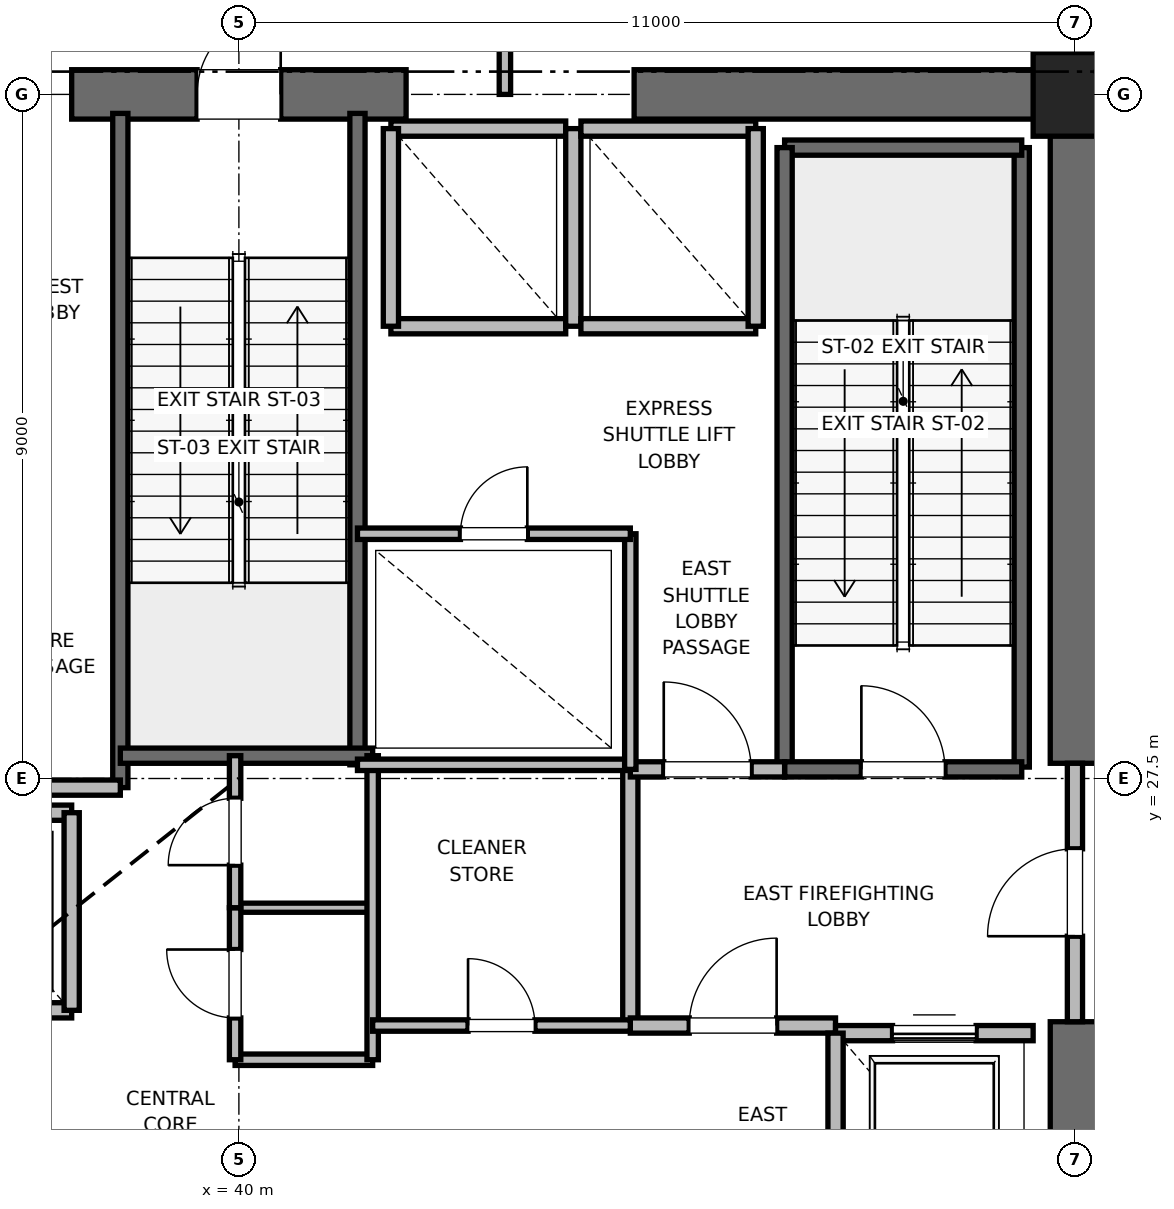
"""IFC4 building model, lengths in metres.
Left out: names, types, materials, properties, quantities, classifications, styles, units other than length and angle.
Written with IfcOpenShell. Run it as: python <this file> out.ifc"""

import sys

from ifc_helpers import new_model, si_unit, direction, frame, frame_2d, origin, origin_2d, place, context, subcontext, project, spatial, rectangle, extrude, element, fill, save


model = new_model("IFC4")
c1 = context("Model", 3, precision=1e-05, world=origin(), true_north=direction((0.0, 1.0)))
c2 = subcontext(c1, "Body", "Model", "MODEL_VIEW")
j1 = project(units=[si_unit("LENGTHUNIT", "METRE"), si_unit("PLANEANGLEUNIT", "RADIAN")], contexts=[c1])
p1 = place(None, origin())
s1 = spatial("IfcSite", under=j1, at=p1, CompositionType="ELEMENT")
p2 = place(p1, origin())
s2 = spatial("IfcBuilding", under=s1, at=p2, CompositionType="ELEMENT")
p3 = place(p2, frame((0.0, 0.0, 107.6)))
s3 = spatial("IfcBuildingStorey", under=s2, at=p3, CompositionType="ELEMENT", Elevation=107.6)
p4 = place(p3, frame((51.0, 36.5, 0.0), z_axis=(0.0, 0.0, 1.0), x_axis=(1.0, 0.0, 0.0)))
e1 = element("IfcColumn", 1, at=p4, inside=s3, PredefinedType="PILASTER", context=c2, shape_type="SweptSolid", body=[
    extrude(rectangle(XDim=1.1, YDim=1.1, at=origin_2d()), origin(), (0.0, 0.0, 1.0), 5.4),
])
p5 = place(p3, frame((37.8, 36.5, 0.0), z_axis=(0.0, 0.0, 1.0), x_axis=(1.0, 0.0, 0.0)))
e2 = element("IfcWall", 2, at=p5, inside=s3, PredefinedType="SHEAR", context=c2, shape_type="SweptSolid", body=[
    extrude(rectangle(XDim=4.4, YDim=0.65, at=frame_2d((2.2, 0.0))), origin(), (0.0, 0.0, 1.0), 5.1),
])
p6 = place(p5, frame((1.65, 0.0, 0.0)))
e3 = element("IfcOpeningElement", 3, at=p6, cuts=e2, PredefinedType="OPENING", context=c2, shape_type="SweptSolid", body=[
    extrude(rectangle(XDim=1.1, YDim=2.15, at=frame_2d((0.55, 1.075))), frame((0.0, 0.325, 0.0), z_axis=(0.0, -1.0, 0.0), x_axis=(1.0, 0.0, 0.0)), (0.0, 0.0, 1.0), 0.65),
])
for number, where, z_axis, x_axis in (
    (4, (45.2, 36.5, 0.0), (0.0, 0.0, 1.0), (1.0, 0.0, 0.0)),
    (5, (51.0, 18.5, 0.0), (0.0, 0.0, 1.0), (0.0, 1.0, 0.0)),
):
    element("IfcWall", number, at=place(p3, frame(where, z_axis=z_axis, x_axis=x_axis)), inside=s3, PredefinedType="SHEAR", context=c2, shape_type="SweptSolid", body=[
        extrude(rectangle(XDim=5.8, YDim=0.65, at=frame_2d((2.9, 0.0))), origin(), (0.0, 0.0, 1.0), 5.1),
    ])
p7 = place(p3, frame((51.0, 27.7, 0.0), z_axis=(0.0, 0.0, 1.0), x_axis=(0.0, 1.0, 0.0)))
e6 = element("IfcWall", 6, at=p7, inside=s3, PredefinedType="SHEAR", context=c2, shape_type="SweptSolid", body=[
    extrude(rectangle(XDim=8.8, YDim=0.65, at=frame_2d((4.4, 0.0))), origin(), (0.0, 0.0, 1.0), 5.1),
])
p8 = place(p3, frame((50.3, 27.65, 0.0), z_axis=(0.0, 0.0, 1.0), x_axis=(0.0, 1.0, 0.0)))
e7 = element("IfcWall", 7, at=p8, inside=s3, PredefinedType="SOLIDWALL", context=c2, shape_type="SweptSolid", body=[
    extrude(rectangle(XDim=8.15, YDim=0.2, at=frame_2d((4.075, 0.0))), origin(), (0.0, 0.0, 1.0), 5.1),
])
p9 = place(p3, frame((47.18, 35.8, 0.0), z_axis=(0.0, 0.0, 1.0), x_axis=(1.0, 0.0, 0.0)))
e8 = element("IfcWall", 8, at=p9, inside=s3, PredefinedType="SOLIDWALL", context=c2, shape_type="SweptSolid", body=[
    extrude(rectangle(XDim=3.12, YDim=0.2, at=frame_2d((1.56, 0.0))), origin(), (0.0, 0.0, 1.0), 5.1),
])
p10 = place(p3, frame((47.18, 27.62, 0.0), z_axis=(0.0, 0.0, 1.0), x_axis=(0.0, 1.0, 0.0)))
e9 = element("IfcWall", 9, at=p10, inside=s3, PredefinedType="SOLIDWALL", context=c2, shape_type="SweptSolid", body=[
    extrude(rectangle(XDim=8.18, YDim=0.2, at=frame_2d((4.09, 0.0))), origin(), (0.0, 0.0, 1.0), 5.1),
])
p11 = place(p3, frame((47.18, 27.62, 0.0), z_axis=(0.0, 0.0, 1.0), x_axis=(1.0, 0.0, 0.0)))
e10 = element("IfcWall", 10, at=p11, inside=s3, PredefinedType="SOLIDWALL", context=c2, shape_type="SweptSolid", body=[
    extrude(rectangle(XDim=3.12, YDim=0.2, at=frame_2d((1.56, 0.0))), origin(), (0.0, 0.0, 1.0), 5.1),
])
p12 = place(p11, frame((1.01, 0.0, 0.0)))
e11 = element("IfcOpeningElement", 11, at=p12, cuts=e10, PredefinedType="OPENING", context=c2, shape_type="SweptSolid", body=[
    extrude(rectangle(XDim=1.1, YDim=2.15, at=frame_2d((0.55, 1.075))), frame((0.0, 0.1, 0.0), z_axis=(0.0, -1.0, 0.0), x_axis=(1.0, 0.0, 0.0)), (0.0, 0.0, 1.0), 0.2),
])
p13 = place(p3, frame((38.44, 27.38, 0.0), z_axis=(0.0, 0.0, 1.0), x_axis=(0.0, 1.0, 0.0)))
e12 = element("IfcWall", 12, at=p13, inside=s3, PredefinedType="SOLIDWALL", context=c2, shape_type="SweptSolid", body=[
    extrude(rectangle(XDim=8.87, YDim=0.2, at=frame_2d((4.435, 0.0))), origin(), (0.0, 0.0, 1.0), 5.1),
])
p14 = place(p3, frame((41.56, 27.68, 0.0), z_axis=(0.0, 0.0, 1.0), x_axis=(0.0, 1.0, 0.0)))
e13 = element("IfcWall", 13, at=p14, inside=s3, PredefinedType="SOLIDWALL", context=c2, shape_type="SweptSolid", body=[
    extrude(rectangle(XDim=8.57, YDim=0.2, at=frame_2d((4.285, 0.0))), origin(), (0.0, 0.0, 1.0), 5.1),
])
p15 = place(p3, frame((38.44, 27.8, 0.0), z_axis=(0.0, 0.0, 1.0), x_axis=(1.0, 0.0, 0.0)))
e14 = element("IfcWall", 14, at=p15, inside=s3, PredefinedType="SOLIDWALL", context=c2, shape_type="SweptSolid", body=[
    extrude(rectangle(XDim=3.32, YDim=0.2, at=frame_2d((1.66, 0.0))), origin(), (0.0, 0.0, 1.0), 5.1),
])
p16 = place(p3, frame((32.82, 27.38, 0.0), z_axis=(0.0, 0.0, 1.0), x_axis=(1.0, 0.0, 0.0)))
e15 = element("IfcWall", 15, at=p16, inside=s3, PredefinedType="PARTITIONING", context=c2, shape_type="SweptSolid", body=[
    extrude(rectangle(XDim=5.62, YDim=0.2, at=frame_2d((2.81, 0.0))), origin(), (0.0, 0.0, 1.0), 5.1),
])
p17 = place(p3, frame((45.15, 24.25, 0.0), z_axis=(0.0, 0.0, 1.0), x_axis=(0.0, 1.0, 0.0)))
e16 = element("IfcWall", 16, at=p17, inside=s3, PredefinedType="PARTITIONING", context=c2, shape_type="SweptSolid", body=[
    extrude(rectangle(XDim=3.37, YDim=0.2, at=frame_2d((1.685, 0.0))), origin(), (0.0, 0.0, 1.0), 5.1),
])
p18 = place(p3, frame((45.15, 24.25, 0.0), z_axis=(0.0, 0.0, 1.0), x_axis=(1.0, 0.0, 0.0)))
e17 = element("IfcWall", 17, at=p18, inside=s3, PredefinedType="PARTITIONING", context=c2, shape_type="SweptSolid", body=[
    extrude(rectangle(XDim=2.7, YDim=0.2, at=frame_2d((1.35, 0.0))), origin(), (0.0, 0.0, 1.0), 5.1),
])
p19 = place(p18, frame((0.775, 0.0, 0.0)))
e18 = element("IfcOpeningElement", 18, at=p19, cuts=e17, PredefinedType="OPENING", context=c2, shape_type="SweptSolid", body=[
    extrude(rectangle(XDim=1.15, YDim=2.2, at=frame_2d((0.575, 1.1))), frame((0.0, 0.1, 0.0), z_axis=(0.0, -1.0, 0.0), x_axis=(1.0, 0.0, 0.0)), (0.0, 0.0, 1.0), 0.2),
])
p20 = place(p3, frame((45.15, 27.62, 0.0), z_axis=(0.0, 0.0, 1.0), x_axis=(1.0, 0.0, 0.0)))
e19 = element("IfcWall", 19, at=p20, inside=s3, PredefinedType="PARTITIONING", context=c2, shape_type="SweptSolid", body=[
    extrude(rectangle(XDim=2.03, YDim=0.2, at=frame_2d((1.015, 0.0))), origin(), (0.0, 0.0, 1.0), 5.1),
])
p21 = place(p20, frame((0.44, 0.0, 0.0)))
e20 = element("IfcOpeningElement", 20, at=p21, cuts=e19, PredefinedType="OPENING", context=c2, shape_type="SweptSolid", body=[
    extrude(rectangle(XDim=1.15, YDim=2.2, at=frame_2d((0.575, 1.1))), frame((0.0, 0.1, 0.0), z_axis=(0.0, -1.0, 0.0), x_axis=(1.0, 0.0, 0.0)), (0.0, 0.0, 1.0), 0.2),
])
p22 = place(p3, frame((51.0, 24.3, 0.0), z_axis=(0.0, 0.0, 1.0), x_axis=(0.0, 1.0, 0.0)))
e21 = element("IfcWall", 21, at=p22, inside=s3, PredefinedType="PARTITIONING", context=c2, shape_type="SweptSolid", body=[
    extrude(rectangle(XDim=3.4, YDim=0.2, at=frame_2d((1.7, 0.0))), origin(), (0.0, 0.0, 1.0), 3.88),
])
p23 = place(p22, frame((1.125, 0.0, 0.0)))
e22 = element("IfcOpeningElement", 22, at=p23, cuts=e21, PredefinedType="OPENING", context=c2, shape_type="SweptSolid", body=[
    extrude(rectangle(XDim=1.15, YDim=2.2, at=frame_2d((0.575, 1.1))), frame((0.0, 0.1, 0.0), z_axis=(0.0, -1.0, 0.0), x_axis=(1.0, 0.0, 0.0)), (0.0, 0.0, 1.0), 0.2),
])
p24 = place(p3, frame((50.45, 24.15, 0.0), z_axis=(0.0, 0.0, 1.0), x_axis=(-1.0, 0.0, 0.0)))
e23 = element("IfcWall", 23, at=p24, inside=s3, PredefinedType="SOLIDWALL", context=c2, shape_type="SweptSolid", body=[
    extrude(rectangle(XDim=2.6, YDim=0.2, at=frame_2d((1.3, 0.0))), origin(), (0.0, 0.0, 1.0), 3.88),
])
p25 = place(p24, frame((0.75, 0.0, 0.0)))
e24 = element("IfcOpeningElement", 24, at=p25, cuts=e23, PredefinedType="OPENING", context=c2, shape_type="SweptSolid", body=[
    extrude(rectangle(XDim=1.1, YDim=2.2, at=frame_2d((0.55, 1.1))), frame((0.0, 0.1, 0.0), z_axis=(0.0, -1.0, 0.0), x_axis=(1.0, 0.0, 0.0)), (0.0, 0.0, 1.0), 0.2),
])
p26 = place(p3, frame((47.85, 24.15, 0.0), z_axis=(0.0, 0.0, 1.0), x_axis=(0.0, -1.0, 0.0)))
e25 = element("IfcWall", 25, at=p26, inside=s3, PredefinedType="SOLIDWALL", context=c2, shape_type="SweptSolid", body=[
    extrude(rectangle(XDim=3.0, YDim=0.2, at=frame_2d((1.5, 0.0))), origin(), (0.0, 0.0, 1.0), 5.1),
])
p27 = place(p3, frame((35.5, 24.45, 0.0), z_axis=(0.0, 0.0, 1.0), x_axis=(1.0, 0.0, 0.0)))
e26 = element("IfcWall", 26, at=p27, inside=s3, PredefinedType="SOLIDWALL", context=c2, shape_type="SweptSolid", body=[
    extrude(rectangle(XDim=2.3, YDim=0.2, at=frame_2d((1.15, 0.0))), origin(), (0.0, 0.0, 1.0), 5.1),
])
p28 = place(p27, frame((0.6, 0.0, 0.0)))
e27 = element("IfcOpeningElement", 27, at=p28, cuts=e26, PredefinedType="OPENING", context=c2, shape_type="SweptSolid", body=[
    extrude(rectangle(XDim=1.1, YDim=2.2, at=frame_2d((0.55, 1.1))), frame((0.0, 0.1, 0.0), z_axis=(0.0, -1.0, 0.0), x_axis=(1.0, 0.0, 0.0)), (0.0, 0.0, 1.0), 0.2),
])
p29 = place(p3, frame((37.8, 27.05, 0.0), z_axis=(0.0, 0.0, 1.0), x_axis=(-1.0, 0.0, 0.0)))
e28 = element("IfcWall", 28, at=p29, inside=s3, PredefinedType="SOLIDWALL", context=c2, shape_type="SweptSolid", body=[
    extrude(rectangle(XDim=2.3, YDim=0.2, at=frame_2d((1.15, 0.0))), origin(), (0.0, 0.0, 1.0), 5.1),
])
p30 = place(p3, frame((37.8, 24.45, 0.0), z_axis=(0.0, 0.0, 1.0), x_axis=(0.0, 1.0, 0.0)))
e29 = element("IfcWall", 29, at=p30, inside=s3, PredefinedType="SOLIDWALL", context=c2, shape_type="SweptSolid", body=[
    extrude(rectangle(XDim=2.6, YDim=0.2, at=frame_2d((1.3, 0.0))), origin(), (0.0, 0.0, 1.0), 5.1),
])
p31 = place(p3, frame((42.0, 33.45, 0.0), z_axis=(0.0, 0.0, 1.0), x_axis=(1.0, 0.0, 0.0)))
e30 = element("IfcWall", 30, at=p31, inside=s3, PredefinedType="SOLIDWALL", context=c2, shape_type="SweptSolid", body=[
    extrude(rectangle(XDim=2.3, YDim=0.2, at=frame_2d((1.15, 0.0))), origin(), (0.0, 0.0, 1.0), 5.1),
])
p32 = place(p3, frame((44.3, 36.05, 0.0), z_axis=(0.0, 0.0, 1.0), x_axis=(-1.0, 0.0, 0.0)))
e31 = element("IfcWall", 31, at=p32, inside=s3, PredefinedType="SOLIDWALL", context=c2, shape_type="SweptSolid", body=[
    extrude(rectangle(XDim=2.3, YDim=0.2, at=frame_2d((1.15, 0.0))), origin(), (0.0, 0.0, 1.0), 3.88),
])
for number, where, z_axis, x_axis in (
    (32, (42.0, 36.05, 0.0), (0.0, 0.0, 1.0), (0.0, -1.0, 0.0)),
    (33, (44.4, 33.45, 0.0), (0.0, 0.0, 1.0), (0.0, 1.0, 0.0)),
):
    element("IfcWall", number, at=place(p3, frame(where, z_axis=z_axis, x_axis=x_axis)), inside=s3, PredefinedType="SOLIDWALL", context=c2, shape_type="SweptSolid", body=[
        extrude(rectangle(XDim=2.6, YDim=0.2, at=frame_2d((1.3, 0.0))), origin(), (0.0, 0.0, 1.0), 3.88),
    ])
p33 = place(p3, frame((44.5, 33.45, 0.0), z_axis=(0.0, 0.0, 1.0), x_axis=(1.0, 0.0, 0.0)))
e34 = element("IfcWall", 34, at=p33, inside=s3, PredefinedType="SOLIDWALL", context=c2, shape_type="SweptSolid", body=[
    extrude(rectangle(XDim=2.3, YDim=0.2, at=frame_2d((1.15, 0.0))), origin(), (0.0, 0.0, 1.0), 5.1),
])
p34 = place(p3, frame((46.8, 36.05, 0.0), z_axis=(0.0, 0.0, 1.0), x_axis=(-1.0, 0.0, 0.0)))
e35 = element("IfcWall", 35, at=p34, inside=s3, PredefinedType="SOLIDWALL", context=c2, shape_type="SweptSolid", body=[
    extrude(rectangle(XDim=2.3, YDim=0.2, at=frame_2d((1.15, 0.0))), origin(), (0.0, 0.0, 1.0), 3.88),
])
p35 = place(p3, frame((46.8, 33.45, 0.0), z_axis=(0.0, 0.0, 1.0), x_axis=(0.0, 1.0, 0.0)))
e36 = element("IfcWall", 36, at=p35, inside=s3, PredefinedType="SOLIDWALL", context=c2, shape_type="SweptSolid", body=[
    extrude(rectangle(XDim=2.6, YDim=0.2, at=frame_2d((1.3, 0.0))), origin(), (0.0, 0.0, 1.0), 5.1),
])
p36 = place(p3, frame((39.95, 23.8, 0.0), z_axis=(0.0, 0.0, 1.0), x_axis=(1.0, 0.0, 0.0)))
e37 = element("IfcWall", 37, at=p36, inside=s3, PredefinedType="PARTITIONING", context=c2, shape_type="SweptSolid", body=[
    extrude(rectangle(XDim=1.81, YDim=0.15, at=frame_2d((0.905, 0.0))), origin(), (0.0, 0.0, 1.0), 2.85),
])
p37 = place(p3, frame((39.95, 25.8, 0.0), z_axis=(0.0, 0.0, 1.0), x_axis=(1.0, 0.0, 0.0)))
e38 = element("IfcWall", 38, at=p37, inside=s3, PredefinedType="PARTITIONING", context=c2, shape_type="SweptSolid", body=[
    extrude(rectangle(XDim=1.81, YDim=0.12, at=frame_2d((0.905, 0.0))), origin(), (0.0, 0.0, 1.0), 2.85),
])
p38 = place(p3, frame((41.76, 23.8, 0.0), z_axis=(0.0, 0.0, 1.0), x_axis=(0.0, 1.0, 0.0)))
e39 = element("IfcWall", 39, at=p38, inside=s3, PredefinedType="PARTITIONING", context=c2, shape_type="SweptSolid", body=[
    extrude(rectangle(XDim=4.0, YDim=0.15, at=frame_2d((2.0, 0.0))), origin(), (0.0, 0.0, 1.0), 2.85),
])
p39 = place(p3, frame((39.95, 23.8, 0.0), z_axis=(0.0, 0.0, 1.0), x_axis=(0.0, 1.0, 0.0)))
e40 = element("IfcWall", 40, at=p39, inside=s3, PredefinedType="PARTITIONING", context=c2, shape_type="SweptSolid", body=[
    extrude(rectangle(XDim=2.0, YDim=0.15, at=frame_2d((1.0, 0.0))), origin(), (0.0, 0.0, 1.0), 2.85),
])
p40 = place(p39, frame((0.55, 0.0, 0.0)))
e41 = element("IfcOpeningElement", 41, at=p40, cuts=e40, PredefinedType="OPENING", context=c2, shape_type="SweptSolid", body=[
    extrude(rectangle(XDim=0.9, YDim=2.1, at=frame_2d((0.45, 1.05))), frame((0.0, 0.075, 0.0), z_axis=(0.0, -1.0, 0.0), x_axis=(1.0, 0.0, 0.0)), (0.0, 0.0, 1.0), 0.15),
])
p41 = place(p3, frame((39.95, 25.8, 0.0), z_axis=(0.0, 0.0, 1.0), x_axis=(0.0, 1.0, 0.0)))
e42 = element("IfcWall", 42, at=p41, inside=s3, PredefinedType="PARTITIONING", context=c2, shape_type="SweptSolid", body=[
    extrude(rectangle(XDim=2.0, YDim=0.15, at=frame_2d((1.0, 0.0))), origin(), (0.0, 0.0, 1.0), 2.85),
])
p42 = place(p41, frame((0.56, 0.0, 0.0)))
e43 = element("IfcOpeningElement", 43, at=p42, cuts=e42, PredefinedType="OPENING", context=c2, shape_type="SweptSolid", body=[
    extrude(rectangle(XDim=0.88, YDim=2.1, at=frame_2d((0.44, 1.05))), frame((0.0, 0.075, 0.0), z_axis=(0.0, -1.0, 0.0), x_axis=(1.0, 0.0, 0.0)), (0.0, 0.0, 1.0), 0.15),
])
p43 = place(p3, frame((41.56, 27.68, 0.0), z_axis=(0.0, 0.0, 1.0), x_axis=(1.0, 0.0, 0.0)))
e44 = element("IfcWall", 44, at=p43, inside=s3, PredefinedType="PARTITIONING", context=c2, shape_type="SweptSolid", body=[
    extrude(rectangle(XDim=3.59, YDim=0.15, at=frame_2d((1.795, 0.0))), origin(), (0.0, 0.0, 1.0), 2.85),
])
p44 = place(p3, frame((41.76, 24.25, 0.0), z_axis=(0.0, 0.0, 1.0), x_axis=(1.0, 0.0, 0.0)))
e45 = element("IfcWall", 45, at=p44, inside=s3, PredefinedType="PARTITIONING", context=c2, shape_type="SweptSolid", body=[
    extrude(rectangle(XDim=3.39, YDim=0.15, at=frame_2d((1.695, 0.0))), origin(), (0.0, 0.0, 1.0), 2.85),
])
p45 = place(p44, frame((1.255, 0.0, 0.0)))
e46 = element("IfcOpeningElement", 46, at=p45, cuts=e45, PredefinedType="OPENING", context=c2, shape_type="SweptSolid", body=[
    extrude(rectangle(XDim=0.88, YDim=2.1, at=frame_2d((0.44, 1.05))), frame((0.0, 0.075, 0.0), z_axis=(0.0, -1.0, 0.0), x_axis=(1.0, 0.0, 0.0)), (0.0, 0.0, 1.0), 0.15),
])
p46 = place(p3, frame((45.15, 27.62, 0.0), z_axis=(0.0, 0.0, 1.0), x_axis=(0.0, 1.0, 0.0)))
e47 = element("IfcWall", 47, at=p46, inside=s3, PredefinedType="PARTITIONING", context=c2, shape_type="SweptSolid", body=[
    extrude(rectangle(XDim=3.1, YDim=0.15, at=frame_2d((1.55, 0.0))), origin(), (0.0, 0.0, 1.0), 2.85),
])
p47 = place(p3, frame((41.56, 30.72, 0.0), z_axis=(0.0, 0.0, 1.0), x_axis=(1.0, 0.0, 0.0)))
e48 = element("IfcWall", 48, at=p47, inside=s3, PredefinedType="PARTITIONING", context=c2, shape_type="SweptSolid", body=[
    extrude(rectangle(XDim=3.59, YDim=0.15, at=frame_2d((1.795, 0.0))), origin(), (0.0, 0.0, 1.0), 2.85),
])
p48 = place(p47, frame((1.355, 0.0, 0.0)))
e49 = element("IfcOpeningElement", 49, at=p48, cuts=e48, PredefinedType="OPENING", context=c2, shape_type="SweptSolid", body=[
    extrude(rectangle(XDim=0.88, YDim=2.1, at=frame_2d((0.44, 1.05))), frame((0.0, 0.075, 0.0), z_axis=(0.0, -1.0, 0.0), x_axis=(1.0, 0.0, 0.0)), (0.0, 0.0, 1.0), 0.15),
])
p49 = place(p3, frame((43.5, 36.5, 0.0), z_axis=(0.0, 0.0, 1.0), x_axis=(0.0, 1.0, 0.0)))
e50 = element("IfcWall", 50, at=p49, inside=s3, PredefinedType="PARTITIONING", context=c2, shape_type="SweptSolid", body=[
    extrude(rectangle(XDim=2.7, YDim=0.15, at=frame_2d((1.35, 0.0))), origin(), (0.0, 0.0, 1.0), 2.85),
])
p50 = place(p49, frame((0.875, 0.0, 0.0)))
e51 = element("IfcOpeningElement", 51, at=p50, cuts=e50, PredefinedType="OPENING", context=c2, shape_type="SweptSolid", body=[
    extrude(rectangle(XDim=0.95, YDim=2.15, at=frame_2d((0.475, 1.075))), frame((0.0, 0.075, 0.0), z_axis=(0.0, -1.0, 0.0), x_axis=(1.0, 0.0, 0.0)), (0.0, 0.0, 1.0), 0.15),
])
p51 = place(p12, origin())
e52 = element("IfcDoor", 52, at=p51, inside=s3, OperationType="SINGLE_SWING_LEFT", PredefinedType="DOOR", context=c2, shape_type="SweptSolid", body=[
    extrude(rectangle(XDim=1.1, YDim=2.15, at=frame_2d((0.55, 1.075))), frame((0.0, 0.025, 0.0), z_axis=(0.0, -1.0, 0.0), x_axis=(1.0, 0.0, 0.0)), (0.0, 0.0, 1.0), 0.05),
])
fill(e11, e52)
p52 = place(p6, origin())
e53 = element("IfcDoor", 53, at=p52, inside=s3, OperationType="SINGLE_SWING_RIGHT", PredefinedType="DOOR", context=c2, shape_type="SweptSolid", body=[
    extrude(rectangle(XDim=1.1, YDim=2.15, at=frame_2d((0.55, 1.075))), frame((0.0, 0.025, 0.0), z_axis=(0.0, -1.0, 0.0), x_axis=(1.0, 0.0, 0.0)), (0.0, 0.0, 1.0), 0.05),
])
fill(e3, e53)
p53 = place(p19, origin())
e54 = element("IfcDoor", 54, at=p53, inside=s3, OperationType="SINGLE_SWING_RIGHT", PredefinedType="DOOR", context=c2, shape_type="SweptSolid", body=[
    extrude(rectangle(XDim=1.15, YDim=2.2, at=frame_2d((0.575, 1.1))), frame((0.0, 0.025, 0.0), z_axis=(0.0, -1.0, 0.0), x_axis=(1.0, 0.0, 0.0)), (0.0, 0.0, 1.0), 0.05),
])
fill(e18, e54)
p54 = place(p21, origin())
e55 = element("IfcDoor", 55, at=p54, inside=s3, OperationType="SINGLE_SWING_LEFT", PredefinedType="DOOR", context=c2, shape_type="SweptSolid", body=[
    extrude(rectangle(XDim=1.15, YDim=2.2, at=frame_2d((0.575, 1.1))), frame((0.0, 0.025, 0.0), z_axis=(0.0, -1.0, 0.0), x_axis=(1.0, 0.0, 0.0)), (0.0, 0.0, 1.0), 0.05),
])
fill(e20, e55)
p55 = place(p23, origin())
e56 = element("IfcDoor", 56, at=p55, inside=s3, OperationType="SINGLE_SWING_LEFT", PredefinedType="DOOR", context=c2, shape_type="SweptSolid", body=[
    extrude(rectangle(XDim=1.15, YDim=2.2, at=frame_2d((0.575, 1.1))), frame((0.0, 0.025, 0.0), z_axis=(0.0, -1.0, 0.0), x_axis=(1.0, 0.0, 0.0)), (0.0, 0.0, 1.0), 0.05),
])
fill(e22, e56)
p56 = place(p25, origin())
e57 = element("IfcDoor", 57, at=p56, inside=s3, OperationType="SLIDING_TO_RIGHT", PredefinedType="DOOR", context=c2, shape_type="SweptSolid", body=[
    extrude(rectangle(XDim=1.1, YDim=2.2, at=frame_2d((0.55, 1.1))), frame((0.0, 0.025, 0.0), z_axis=(0.0, -1.0, 0.0), x_axis=(1.0, 0.0, 0.0)), (0.0, 0.0, 1.0), 0.05),
])
fill(e24, e57)
p57 = place(p40, origin())
e58 = element("IfcDoor", 58, at=p57, inside=s3, OperationType="SINGLE_SWING_RIGHT", PredefinedType="DOOR", context=c2, shape_type="SweptSolid", body=[
    extrude(rectangle(XDim=0.9, YDim=2.1, at=frame_2d((0.45, 1.05))), frame((0.0, 0.025, 0.0), z_axis=(0.0, -1.0, 0.0), x_axis=(1.0, 0.0, 0.0)), (0.0, 0.0, 1.0), 0.05),
])
fill(e41, e58)
p58 = place(p42, origin())
e59 = element("IfcDoor", 59, at=p58, inside=s3, OperationType="SINGLE_SWING_LEFT", PredefinedType="DOOR", context=c2, shape_type="SweptSolid", body=[
    extrude(rectangle(XDim=0.88, YDim=2.1, at=frame_2d((0.44, 1.05))), frame((0.0, 0.025, 0.0), z_axis=(0.0, -1.0, 0.0), x_axis=(1.0, 0.0, 0.0)), (0.0, 0.0, 1.0), 0.05),
])
fill(e43, e59)
p59 = place(p45, origin())
e60 = element("IfcDoor", 60, at=p59, inside=s3, OperationType="SINGLE_SWING_LEFT", PredefinedType="DOOR", context=c2, shape_type="SweptSolid", body=[
    extrude(rectangle(XDim=0.88, YDim=2.1, at=frame_2d((0.44, 1.05))), frame((0.0, 0.025, 0.0), z_axis=(0.0, -1.0, 0.0), x_axis=(1.0, 0.0, 0.0)), (0.0, 0.0, 1.0), 0.05),
])
fill(e46, e60)
p60 = place(p48, origin())
e61 = element("IfcDoor", 61, at=p60, inside=s3, OperationType="SINGLE_SWING_RIGHT", PredefinedType="DOOR", context=c2, shape_type="SweptSolid", body=[
    extrude(rectangle(XDim=0.88, YDim=2.1, at=frame_2d((0.44, 1.05))), frame((0.0, 0.025, 0.0), z_axis=(0.0, -1.0, 0.0), x_axis=(1.0, 0.0, 0.0)), (0.0, 0.0, 1.0), 0.05),
])
fill(e49, e61)
save(model, sys.argv[1])
